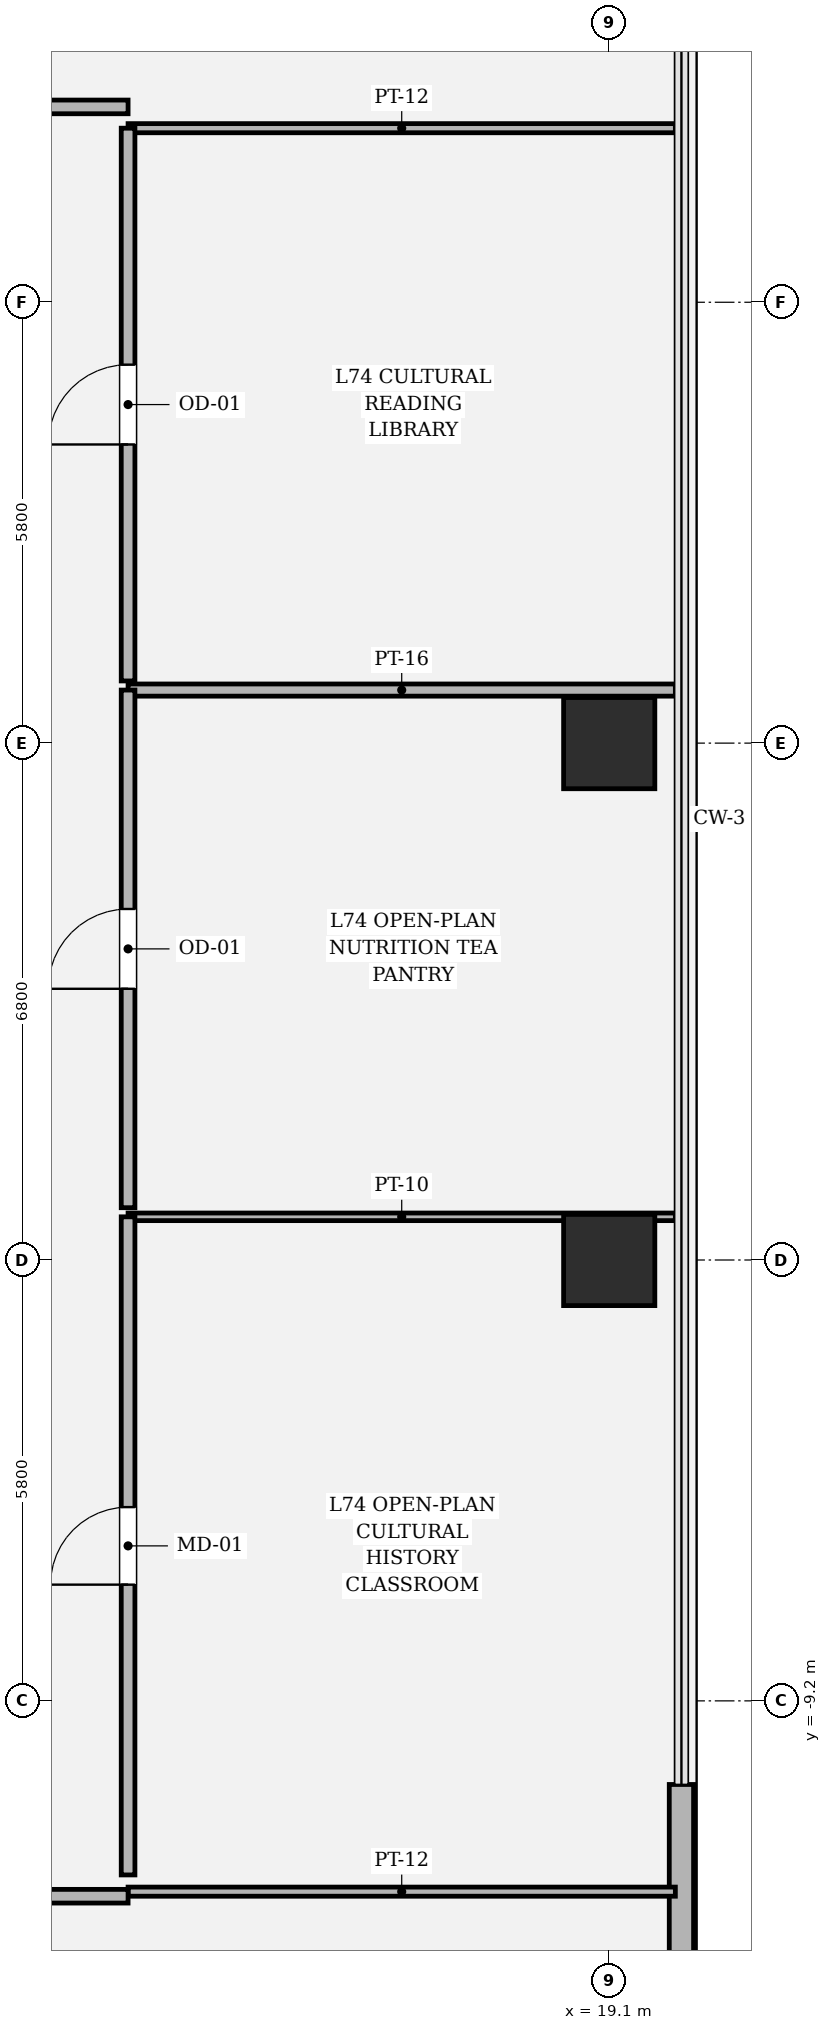
"""IFC4 building model, lengths in metres.
Left out: names, types, materials, properties, quantities, classifications, styles, units other than length and angle.
Written with IfcOpenShell. Run it as: python <this file> out.ifc"""

import sys

from ifc_helpers import new_model, si_unit, direction, frame, frame_2d, origin, origin_2d, place, context, subcontext, project, spatial, rectangle, hollow_rectangle, extrude, element, fill, save


model = new_model("IFC4")
c1 = context("Model", 3, precision=1e-05, world=origin(), true_north=direction((0.0, 1.0)))
c2 = subcontext(c1, "Body", "Model", "MODEL_VIEW")
j1 = project(units=[si_unit("LENGTHUNIT", "METRE"), si_unit("PLANEANGLEUNIT", "RADIAN")], contexts=[c1])
p1 = place(None, origin())
s1 = spatial("IfcSite", under=j1, at=p1, CompositionType="ELEMENT")
p2 = place(p1, origin())
s2 = spatial("IfcBuilding", under=s1, at=p2, CompositionType="ELEMENT")
p3 = place(p2, frame((0.0, 0.0, 313.2)))
s3 = spatial("IfcBuildingStorey", under=s2, at=p3, CompositionType="ELEMENT", Elevation=313.2)
for number, where, z_axis, x_axis in (
    (1, (19.1, -3.4, 0.0), (0.0, 0.0, 1.0), (1.0, 0.0, 0.0)),
    (2, (19.1, 3.4, 0.0), (0.0, 0.0, 1.0), (1.0, 0.0, 0.0)),
):
    element("IfcColumn", number, at=place(p3, frame(where, z_axis=z_axis, x_axis=x_axis)), inside=s3, PredefinedType="COLUMN", context=c2, shape_type="SweptSolid", body=[
        extrude(hollow_rectangle(XDim=1.2, YDim=1.2, WallThickness=0.035, at=origin_2d()), origin(), (0.0, 0.0, 1.0), 4.2),
    ])
p4 = place(p3, frame((20.05, -15.437, 0.0), z_axis=(0.0, 0.0, 1.0), x_axis=(0.0, 1.0, 0.0)))
e3 = element("IfcWall", 3, at=p4, inside=s3, PredefinedType="SOLIDWALL", context=c2, shape_type="SweptSolid", body=[
    extrude(rectangle(XDim=5.137, YDim=0.32, at=frame_2d((2.568, 0.0))), origin(), (0.0, 0.0, 1.0), 3.92),
])
p5 = place(p3, frame((12.77, -11.71, 0.0), z_axis=(0.0, 0.0, 1.0), x_axis=(1.0, 0.0, 0.0)))
e4 = element("IfcWall", 4, at=p5, inside=s3, PredefinedType="PARTITIONING", context=c2, shape_type="SweptSolid", body=[
    extrude(rectangle(XDim=7.2, YDim=0.12, at=frame_2d((3.6, 0.0))), origin(), (0.0, 0.0, 1.0), 2.594),
])
p6 = place(p3, frame((-2.34, -11.77, 0.0), z_axis=(0.0, 0.0, 1.0), x_axis=(1.0, 0.0, 0.0)))
e5 = element("IfcWall", 5, at=p6, inside=s3, PredefinedType="PARTITIONING", context=c2, shape_type="SweptSolid", body=[
    extrude(rectangle(XDim=15.11, YDim=0.18, at=frame_2d((7.555, 0.0))), origin(), (0.0, 0.0, 1.0), 2.594),
])
p7 = place(p6, frame((7.03, 0.0, 0.0)))
e6 = element("IfcOpeningElement", 6, at=p7, cuts=e5, PredefinedType="OPENING", context=c2, shape_type="SweptSolid", body=[
    extrude(rectangle(XDim=1.05, YDim=2.2, at=frame_2d((0.525, 1.1))), frame((0.0, 0.1, 0.0), z_axis=(0.0, -1.0, 0.0), x_axis=(1.0, 0.0, 0.0)), (0.0, 0.0, 1.0), 0.2),
])
p8 = place(p3, frame((12.77, -2.832, 0.0), z_axis=(0.0, 0.0, 1.0), x_axis=(1.0, 0.0, 0.0)))
e7 = element("IfcWall", 7, at=p8, inside=s3, PredefinedType="PARTITIONING", context=c2, shape_type="SweptSolid", body=[
    extrude(rectangle(XDim=7.2, YDim=0.1, at=frame_2d((3.6, 0.0))), origin(), (0.0, 0.0, 1.0), 2.594),
])
p9 = place(p3, frame((12.77, -11.49, 0.0), z_axis=(0.0, 0.0, 1.0), x_axis=(0.0, 1.0, 0.0)))
e8 = element("IfcWall", 8, at=p9, inside=s3, PredefinedType="PARTITIONING", context=c2, shape_type="SweptSolid", body=[
    extrude(rectangle(XDim=8.658, YDim=0.18, at=frame_2d((4.329, 0.0))), origin(), (0.0, 0.0, 1.0), 2.594),
])
p10 = place(p9, frame((3.819, 0.0, 0.0)))
e9 = element("IfcOpeningElement", 9, at=p10, cuts=e8, PredefinedType="OPENING", context=c2, shape_type="SweptSolid", body=[
    extrude(rectangle(XDim=1.02, YDim=2.2, at=frame_2d((0.51, 1.1))), frame((0.0, 0.1, 0.0), z_axis=(0.0, -1.0, 0.0), x_axis=(1.0, 0.0, 0.0)), (0.0, 0.0, 1.0), 0.2),
])
p11 = place(p3, frame((12.77, 4.098, 0.0), z_axis=(0.0, 0.0, 1.0), x_axis=(1.0, 0.0, 0.0)))
e10 = element("IfcWall", 10, at=p11, inside=s3, PredefinedType="PARTITIONING", context=c2, shape_type="SweptSolid", body=[
    extrude(rectangle(XDim=7.2, YDim=0.16, at=frame_2d((3.6, 0.0))), origin(), (0.0, 0.0, 1.0), 2.594),
])
p12 = place(p3, frame((12.77, -2.712, 0.0), z_axis=(0.0, 0.0, 1.0), x_axis=(0.0, 1.0, 0.0)))
e11 = element("IfcWall", 11, at=p12, inside=s3, PredefinedType="PARTITIONING", context=c2, shape_type="SweptSolid", body=[
    extrude(rectangle(XDim=6.81, YDim=0.18, at=frame_2d((3.405, 0.0))), origin(), (0.0, 0.0, 1.0), 2.594),
])
p13 = place(p12, frame((2.88, 0.0, 0.0)))
e12 = element("IfcOpeningElement", 12, at=p13, cuts=e11, PredefinedType="OPENING", context=c2, shape_type="SweptSolid", body=[
    extrude(rectangle(XDim=1.05, YDim=2.2, at=frame_2d((0.525, 1.1))), frame((0.0, 0.1, 0.0), z_axis=(0.0, -1.0, 0.0), x_axis=(1.0, 0.0, 0.0)), (0.0, 0.0, 1.0), 0.2),
])
p14 = place(p3, frame((12.77, 11.49, 0.0), z_axis=(0.0, 0.0, 1.0), x_axis=(1.0, 0.0, 0.0)))
e13 = element("IfcWall", 13, at=p14, inside=s3, PredefinedType="PARTITIONING", context=c2, shape_type="SweptSolid", body=[
    extrude(rectangle(XDim=7.2, YDim=0.12, at=frame_2d((3.6, 0.0))), origin(), (0.0, 0.0, 1.0), 2.594),
])
p15 = place(p3, frame((12.77, 4.218, 0.0), z_axis=(0.0, 0.0, 1.0), x_axis=(0.0, 1.0, 0.0)))
e14 = element("IfcWall", 14, at=p15, inside=s3, PredefinedType="PARTITIONING", context=c2, shape_type="SweptSolid", body=[
    extrude(rectangle(XDim=7.272, YDim=0.18, at=frame_2d((3.636, 0.0))), origin(), (0.0, 0.0, 1.0), 2.594),
])
p16 = place(p15, frame((3.111, 0.0, 0.0)))
e15 = element("IfcOpeningElement", 15, at=p16, cuts=e14, PredefinedType="OPENING", context=c2, shape_type="SweptSolid", body=[
    extrude(rectangle(XDim=1.05, YDim=2.2, at=frame_2d((0.525, 1.1))), frame((0.0, 0.1, 0.0), z_axis=(0.0, -1.0, 0.0), x_axis=(1.0, 0.0, 0.0)), (0.0, 0.0, 1.0), 0.2),
])
p17 = place(p3, frame((12.77, 11.77, 0.0), z_axis=(0.0, 0.0, 1.0), x_axis=(-1.0, 0.0, 0.0)))
e16 = element("IfcWall", 16, at=p17, inside=s3, PredefinedType="PARTITIONING", context=c2, shape_type="SweptSolid", body=[
    extrude(rectangle(XDim=15.11, YDim=0.18, at=frame_2d((7.555, 0.0))), origin(), (0.0, 0.0, 1.0), 2.594),
])
p18 = place(p17, frame((6.855, 0.0, 0.0)))
e17 = element("IfcOpeningElement", 17, at=p18, cuts=e16, PredefinedType="OPENING", context=c2, shape_type="SweptSolid", body=[
    extrude(rectangle(XDim=1.4, YDim=2.25, at=frame_2d((0.7, 1.125))), frame((0.0, 0.1, 0.0), z_axis=(0.0, -1.0, 0.0), x_axis=(1.0, 0.0, 0.0)), (0.0, 0.0, 1.0), 0.2),
])
p19 = place(p10, origin())
e18 = element("IfcDoor", 18, at=p19, inside=s3, OperationType="SINGLE_SWING_LEFT", PredefinedType="DOOR", context=c2, shape_type="SweptSolid", body=[
    extrude(rectangle(XDim=1.02, YDim=2.2, at=frame_2d((0.51, 1.1))), frame((0.0, 0.025, 0.0), z_axis=(0.0, -1.0, 0.0), x_axis=(1.0, 0.0, 0.0)), (0.0, 0.0, 1.0), 0.05),
])
fill(e9, e18)
p20 = place(p13, origin())
e19 = element("IfcDoor", 19, at=p20, inside=s3, OperationType="SINGLE_SWING_LEFT", PredefinedType="DOOR", context=c2, shape_type="SweptSolid", body=[
    extrude(rectangle(XDim=1.05, YDim=2.2, at=frame_2d((0.525, 1.1))), frame((0.0, 0.025, 0.0), z_axis=(0.0, -1.0, 0.0), x_axis=(1.0, 0.0, 0.0)), (0.0, 0.0, 1.0), 0.05),
])
fill(e12, e19)
p21 = place(p16, origin())
e20 = element("IfcDoor", 20, at=p21, inside=s3, OperationType="SINGLE_SWING_LEFT", PredefinedType="DOOR", context=c2, shape_type="SweptSolid", body=[
    extrude(rectangle(XDim=1.05, YDim=2.2, at=frame_2d((0.525, 1.1))), frame((0.0, 0.025, 0.0), z_axis=(0.0, -1.0, 0.0), x_axis=(1.0, 0.0, 0.0)), (0.0, 0.0, 1.0), 0.05),
])
fill(e15, e20)
save(model, sys.argv[1])
